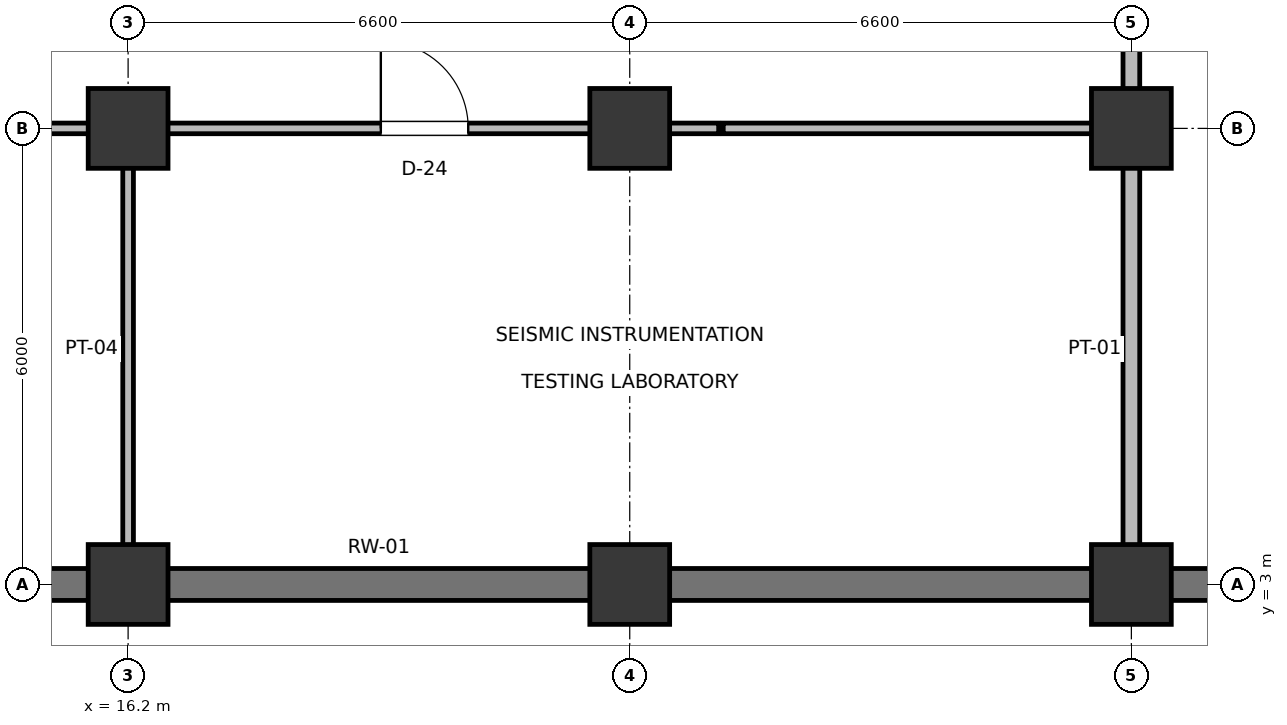
"""IFC4 building model, lengths in metres.
Left out: names, types, materials, properties, quantities, classifications, styles, units other than length and angle.
Written with IfcOpenShell. Run it as: python <this file> out.ifc"""

import sys

from ifc_helpers import new_model, si_unit, direction, frame, frame_2d, origin, origin_2d, place, context, subcontext, project, spatial, rectangle, extrude, element, fill, save


model = new_model("IFC4")
c1 = context("Model", 3, precision=1e-05, world=origin(), true_north=direction((0.0, 1.0)))
c2 = subcontext(c1, "Body", "Model", "MODEL_VIEW")
j1 = project(units=[si_unit("LENGTHUNIT", "METRE"), si_unit("PLANEANGLEUNIT", "RADIAN")], contexts=[c1])
p1 = place(None, origin())
s1 = spatial("IfcSite", under=j1, at=p1, CompositionType="ELEMENT")
p2 = place(p1, origin())
s2 = spatial("IfcBuilding", under=s1, at=p2, CompositionType="ELEMENT")
p3 = place(p2, frame((0.0, 0.0, -4.5)))
s3 = spatial("IfcBuildingStorey", under=s2, at=p3, CompositionType="ELEMENT", Elevation=-4.5)
for number, where, z_axis, x_axis in (
    (1, (16.2, 3.0, 0.0), (0.0, 0.0, 1.0), (1.0, 0.0, 0.0)),
    (2, (16.2, 9.0, 0.0), (0.0, 0.0, 1.0), (1.0, 0.0, 0.0)),
    (3, (22.8, 3.0, 0.0), (0.0, 0.0, 1.0), (1.0, 0.0, 0.0)),
    (4, (22.8, 9.0, 0.0), (0.0, 0.0, 1.0), (1.0, 0.0, 0.0)),
    (5, (29.4, 3.0, 0.0), (0.0, 0.0, 1.0), (1.0, 0.0, 0.0)),
    (6, (29.4, 9.0, 0.0), (0.0, 0.0, 1.0), (1.0, 0.0, 0.0)),
):
    element("IfcColumn", number, at=place(p3, frame(where, z_axis=z_axis, x_axis=x_axis)), inside=s3, PredefinedType="COLUMN", context=c2, shape_type="SweptSolid", body=[
        extrude(rectangle(XDim=1.05, YDim=1.05, at=origin_2d()), origin(), (0.0, 0.0, 1.0), 4.5),
    ])
p4 = place(p3, frame((2.995, 3.0, 0.0), z_axis=(0.0, 0.0, 1.0), x_axis=(1.0, 0.0, 0.0)))
e7 = element("IfcWall", 7, at=p4, inside=s3, PredefinedType="STANDARD", context=c2, shape_type="SweptSolid", body=[
    extrude(rectangle(XDim=33.01, YDim=0.42, at=frame_2d((16.505, 0.0))), origin(), (0.0, 0.0, 1.0), 3.45),
])
p5 = place(p3, frame((16.2, 3.23, 0.0), z_axis=(0.0, 0.0, 1.0), x_axis=(0.0, 1.0, 0.0)))
e8 = element("IfcWall", 8, at=p5, inside=s3, PredefinedType="PARTITIONING", context=c2, shape_type="SweptSolid", body=[
    extrude(rectangle(XDim=5.74, YDim=0.14, at=frame_2d((2.87, 0.0))), origin(), (0.0, 0.0, 1.0), 3.625),
])
p6 = place(p3, frame((10.83, 9.0, 0.0), z_axis=(0.0, 0.0, 1.0), x_axis=(1.0, 0.0, 0.0)))
e9 = element("IfcWall", 9, at=p6, inside=s3, PredefinedType="PARTITIONING", context=c2, shape_type="SweptSolid", body=[
    extrude(rectangle(XDim=5.34, YDim=0.14, at=frame_2d((2.67, 0.0))), origin(), (0.0, 0.0, 1.0), 3.525),
])
p7 = place(p3, frame((29.4, 3.23, 0.0), z_axis=(0.0, 0.0, 1.0), x_axis=(0.0, 1.0, 0.0)))
e10 = element("IfcWall", 10, at=p7, inside=s3, PredefinedType="PARTITIONING", context=c2, shape_type="SweptSolid", body=[
    extrude(rectangle(XDim=5.74, YDim=0.22, at=frame_2d((2.87, 0.0))), origin(), (0.0, 0.0, 1.0), 3.625),
])
p8 = place(p3, frame((24.03, 9.0, 0.0), z_axis=(0.0, 0.0, 1.0), x_axis=(1.0, 0.0, 0.0)))
e11 = element("IfcWall", 11, at=p8, inside=s3, PredefinedType="PARTITIONING", context=c2, shape_type="SweptSolid", body=[
    extrude(rectangle(XDim=5.34, YDim=0.14, at=frame_2d((2.67, 0.0))), origin(), (0.0, 0.0, 1.0), 3.525),
])
p9 = place(p3, frame((16.23, 9.0, 0.0), z_axis=(0.0, 0.0, 1.0), x_axis=(1.0, 0.0, 0.0)))
e12 = element("IfcWall", 12, at=p9, inside=s3, PredefinedType="PARTITIONING", context=c2, shape_type="SweptSolid", body=[
    extrude(rectangle(XDim=7.74, YDim=0.14, at=frame_2d((3.87, 0.0))), origin(), (0.0, 0.0, 1.0), 3.495),
])
p10 = place(p9, frame((3.295, 0.0, 0.0)))
e13 = element("IfcOpeningElement", 13, at=p10, cuts=e12, PredefinedType="OPENING", context=c2, shape_type="SweptSolid", body=[
    extrude(rectangle(XDim=1.15, YDim=2.15, at=frame_2d((0.575, 1.075))), frame((0.0, 0.08, 0.0), z_axis=(0.0, -1.0, 0.0), x_axis=(1.0, 0.0, 0.0)), (0.0, 0.0, 1.0), 0.16),
])
p11 = place(p3, frame((29.4, 9.03, 0.0), z_axis=(0.0, 0.0, 1.0), x_axis=(0.0, 1.0, 0.0)))
e14 = element("IfcWall", 14, at=p11, inside=s3, PredefinedType="PARTITIONING", context=c2, shape_type="SweptSolid", body=[
    extrude(rectangle(XDim=8.94, YDim=0.22, at=frame_2d((4.47, 0.0))), origin(), (0.0, 0.0, 1.0), 3.425),
])
p12 = place(p11, frame((3.57, 0.0, 0.0)))
e15 = element("IfcOpeningElement", 15, at=p12, cuts=e14, PredefinedType="OPENING", context=c2, shape_type="SweptSolid", body=[
    extrude(rectangle(XDim=1.8, YDim=2.4, at=frame_2d((0.9, 1.2))), frame((0.0, 0.12, 0.0), z_axis=(0.0, -1.0, 0.0), x_axis=(1.0, 0.0, 0.0)), (0.0, 0.0, 1.0), 0.24),
])
p13 = place(p10, origin())
e16 = element("IfcDoor", 16, at=p13, inside=s3, OperationType="SINGLE_SWING_LEFT", PredefinedType="DOOR", context=c2, shape_type="SweptSolid", body=[
    extrude(rectangle(XDim=1.15, YDim=2.15, at=frame_2d((0.575, 1.075))), frame((0.0, 0.025, 0.0), z_axis=(0.0, -1.0, 0.0), x_axis=(1.0, 0.0, 0.0)), (0.0, 0.0, 1.0), 0.05),
])
fill(e13, e16)
save(model, sys.argv[1])
